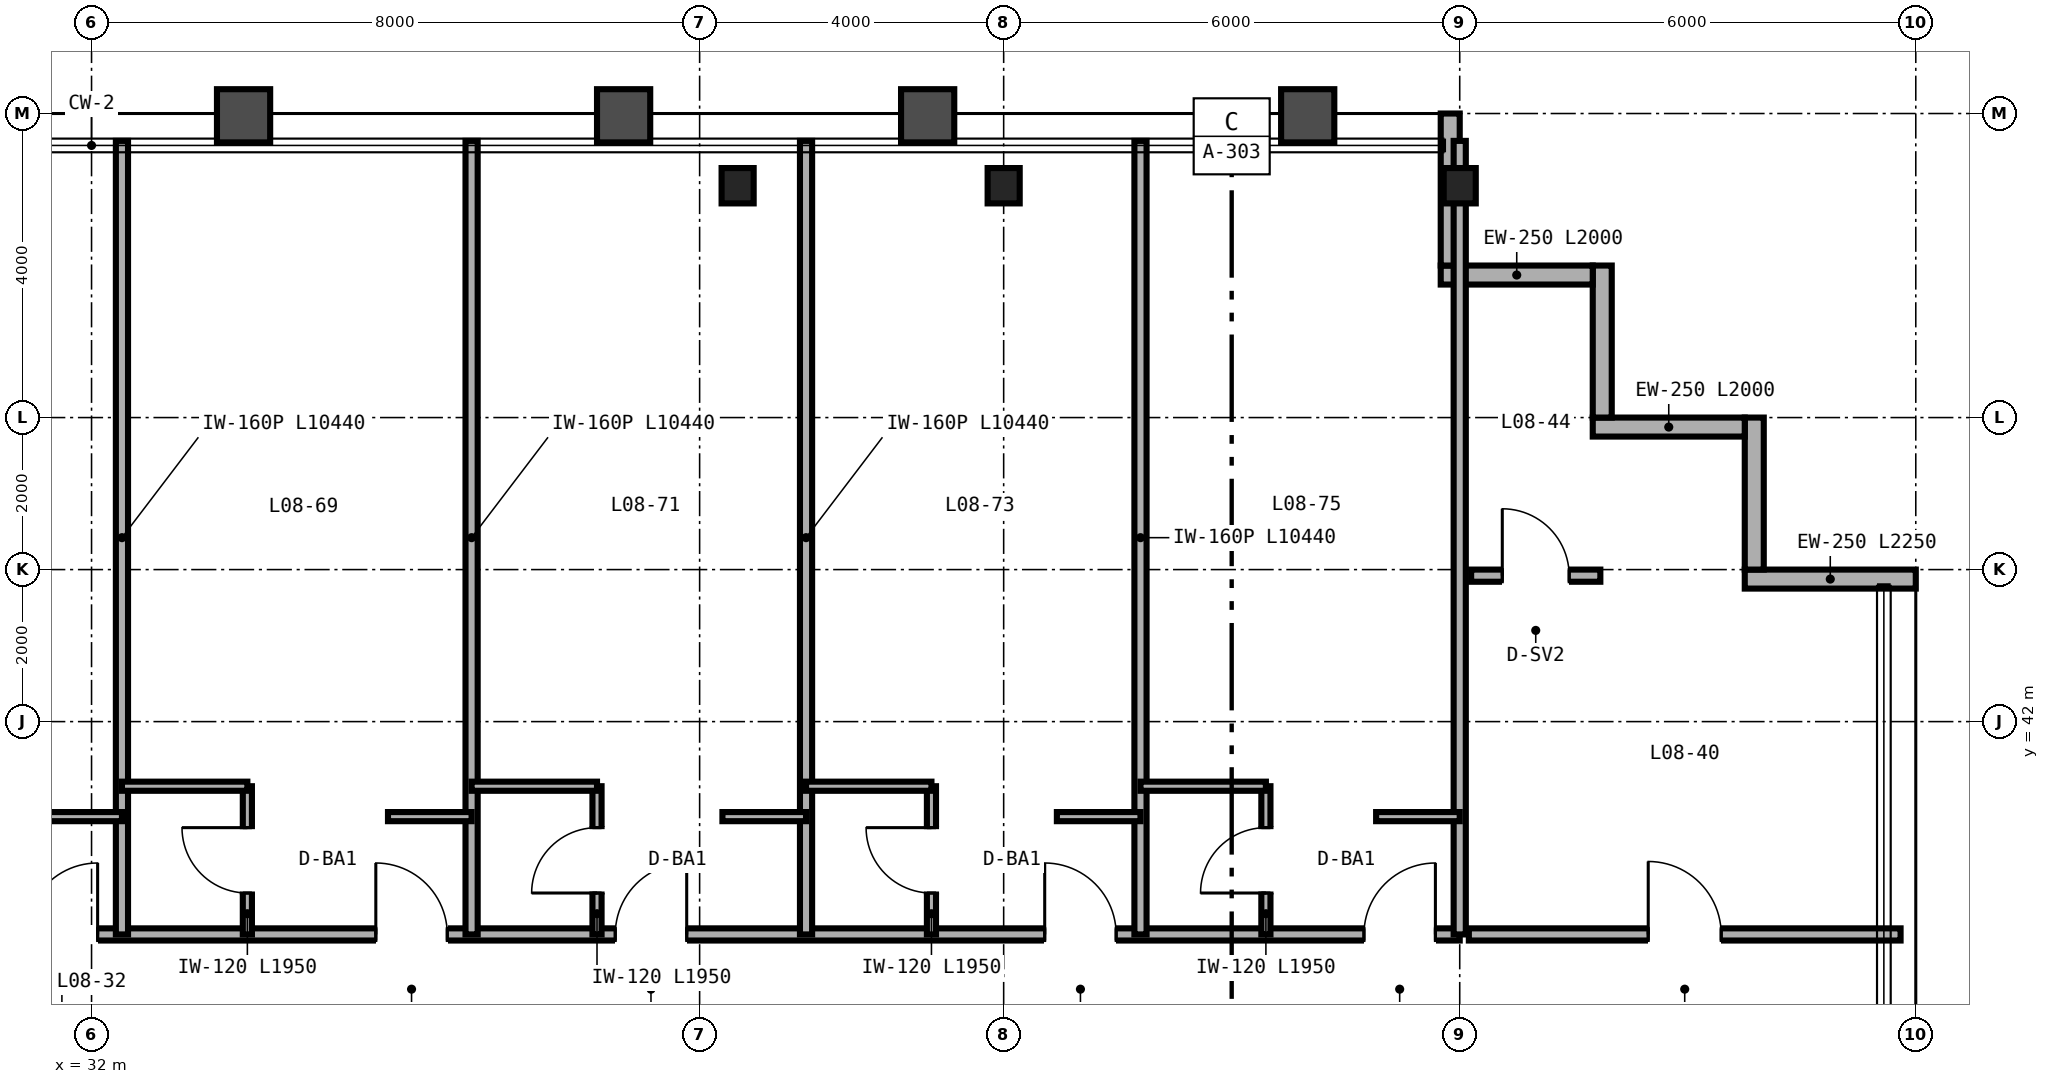
"""IFC4 building model, lengths in metres.
Left out: names, types, materials, properties, quantities, classifications, styles, units other than length and angle.
Written with IfcOpenShell. Run it as: python <this file> out.ifc"""

import sys

from ifc_helpers import new_model, si_unit, direction, frame, frame_2d, origin, origin_2d, place, context, subcontext, project, spatial, rectangle, i_section, extrude, source, transform, mapped, element, fill, save


model = new_model("IFC4")
c1 = context("Model", 3, precision=1e-05, world=origin(), true_north=direction((0.0, 1.0)))
c2 = subcontext(c1, "Body", "Model", "MODEL_VIEW")
j1 = project(units=[si_unit("LENGTHUNIT", "METRE"), si_unit("PLANEANGLEUNIT", "RADIAN")], contexts=[c1])
p1 = place(None, origin())
s1 = spatial("IfcSite", under=j1, at=p1, CompositionType="ELEMENT")
p2 = place(p1, origin())
s2 = spatial("IfcBuilding", under=s1, at=p2, CompositionType="ELEMENT")
p3 = place(p2, frame((0.0, 0.0, 38.4)))
s3 = spatial("IfcBuildingStorey", under=s2, at=p3, CompositionType="ELEMENT", Elevation=38.4)
m1 = source(origin(), c2, "Body", "SweptSolid", [
    extrude(i_section(OverallWidth=0.422, OverallDepth=0.465, WebThickness=0.045, FlangeThickness=0.073, FilletRadius=0.025, at=origin_2d()), origin(), (0.0, 0.0, 1.0), 3.35),
])
for number, where, z_axis, x_axis in (
    (1, (40.5, 49.05, 0.0), (0.0, 0.0, 1.0), (1.0, 0.0, 0.0)),
    (2, (44.0, 49.05, 0.0), (0.0, 0.0, 1.0), (1.0, 0.0, 0.0)),
    (3, (50.0, 49.05, 0.0), (0.0, 0.0, 1.0), (1.0, 0.0, 0.0)),
):
    element("IfcColumn", number, at=place(p3, frame(where, z_axis=z_axis, x_axis=x_axis)), inside=s3, PredefinedType="COLUMN", context=c2, shape_type="MappedRepresentation", body=[
        mapped(m1, transform((0.0, 0.0, 0.0), scale=1.0)),
    ])
p4 = place(p3, frame((56.0, 43.875, 0.0), z_axis=(0.0, 0.0, 1.0), x_axis=(-1.0, 0.0, 0.0)))
e4 = element("IfcWall", 4, at=p4, inside=s3, PredefinedType="SOLIDWALL", context=c2, shape_type="SweptSolid", body=[
    extrude(rectangle(XDim=2.25, YDim=0.25, at=frame_2d((1.125, 0.0))), origin(), (0.0, 0.0, 1.0), 3.35),
])
for number, where, z_axis, x_axis in (
    (5, (53.875, 44.0, 0.0), (0.0, 0.0, 1.0), (0.0, 1.0, 0.0)),
    (6, (53.75, 45.875, 0.0), (0.0, 0.0, 1.0), (-1.0, 0.0, 0.0)),
    (7, (51.875, 46.0, 0.0), (0.0, 0.0, 1.0), (0.0, 1.0, 0.0)),
    (8, (51.75, 47.875, 0.0), (0.0, 0.0, 1.0), (-1.0, 0.0, 0.0)),
):
    element("IfcWall", number, at=place(p3, frame(where, z_axis=z_axis, x_axis=x_axis)), inside=s3, PredefinedType="SOLIDWALL", context=c2, shape_type="SweptSolid", body=[
        extrude(rectangle(XDim=2.0, YDim=0.25, at=frame_2d((1.0, 0.0))), origin(), (0.0, 0.0, 1.0), 3.35),
    ])
p5 = place(p3, frame((49.875, 48.0, 0.0), z_axis=(0.0, 0.0, 1.0), x_axis=(0.0, 1.0, 0.0)))
e9 = element("IfcWall", 9, at=p5, inside=s3, PredefinedType="SOLIDWALL", context=c2, shape_type="SweptSolid", body=[
    extrude(rectangle(XDim=2.0, YDim=0.25, at=frame_2d((1.0, 0.0))), origin(), (0.0, 0.0, 1.0), 2.657),
])
p6 = place(p3, frame((50.12, 39.2, 0.0), z_axis=(0.0, 0.0, 1.0), x_axis=(1.0, 0.0, 0.0)))
e10 = element("IfcWall", 10, at=p6, inside=s3, PredefinedType="PARTITIONING", context=c2, shape_type="SweptSolid", body=[
    extrude(rectangle(XDim=5.68, YDim=0.16, at=frame_2d((2.84, 0.0))), origin(), (0.0, 0.0, 1.0), 3.35),
])
p7 = place(p6, frame((2.36, 0.0, 0.0)))
e11 = element("IfcOpeningElement", 11, at=p7, cuts=e10, PredefinedType="OPENING", context=c2, shape_type="SweptSolid", body=[
    extrude(rectangle(XDim=0.96, YDim=2.15, at=frame_2d((0.48, 1.075))), frame((0.0, 0.09, 0.0), z_axis=(0.0, -1.0, 0.0), x_axis=(1.0, 0.0, 0.0)), (0.0, 0.0, 1.0), 0.18),
])
p8 = place(p3, frame((50.15, 43.92, 0.0), z_axis=(0.0, 0.0, 1.0), x_axis=(1.0, 0.0, 0.0)))
e12 = element("IfcWall", 12, at=p8, inside=s3, PredefinedType="PARTITIONING", context=c2, shape_type="SweptSolid", body=[
    extrude(rectangle(XDim=1.7, YDim=0.16, at=frame_2d((0.85, 0.0))), origin(), (0.0, 0.0, 1.0), 3.35),
])
p9 = place(p8, frame((0.41, 0.0, 0.0)))
e13 = element("IfcOpeningElement", 13, at=p9, cuts=e12, PredefinedType="OPENING", context=c2, shape_type="SweptSolid", body=[
    extrude(rectangle(XDim=0.88, YDim=2.15, at=frame_2d((0.44, 1.075))), frame((0.0, 0.09, 0.0), z_axis=(0.0, -1.0, 0.0), x_axis=(1.0, 0.0, 0.0)), (0.0, 0.0, 1.0), 0.18),
])
p10 = place(p3, frame((14.0, 39.2, 0.0), z_axis=(0.0, 0.0, 1.0), x_axis=(1.0, 0.0, 0.0)))
e14 = element("IfcWall", 14, at=p10, inside=s3, PredefinedType="PARTITIONING", context=c2, shape_type="SweptSolid", body=[
    extrude(rectangle(XDim=36.0, YDim=0.16, at=frame_2d((18.0, 0.0))), origin(), (0.0, 0.0, 1.0), 2.571),
])
p11 = place(p10, frame((3.34, 0.0, 0.0)))
e15 = element("IfcOpeningElement", 15, at=p11, cuts=e14, PredefinedType="OPENING", context=c2, shape_type="SweptSolid", body=[
    extrude(rectangle(XDim=0.94, YDim=2.15, at=frame_2d((0.47, 1.075))), frame((0.0, 0.09, 0.0), z_axis=(0.0, -1.0, 0.0), x_axis=(1.0, 0.0, 0.0)), (0.0, 0.0, 1.0), 0.18),
])
p12 = place(p10, frame((7.79, 0.0, 0.0)))
e16 = element("IfcOpeningElement", 16, at=p12, cuts=e14, PredefinedType="OPENING", context=c2, shape_type="SweptSolid", body=[
    extrude(rectangle(XDim=0.94, YDim=2.15, at=frame_2d((0.47, 1.075))), frame((0.0, 0.09, 0.0), z_axis=(0.0, -1.0, 0.0), x_axis=(1.0, 0.0, 0.0)), (0.0, 0.0, 1.0), 0.18),
])
p13 = place(p10, frame((12.54, 0.0, 0.0)))
e17 = element("IfcOpeningElement", 17, at=p13, cuts=e14, PredefinedType="OPENING", context=c2, shape_type="SweptSolid", body=[
    extrude(rectangle(XDim=0.94, YDim=2.15, at=frame_2d((0.47, 1.075))), frame((0.0, 0.09, 0.0), z_axis=(0.0, -1.0, 0.0), x_axis=(1.0, 0.0, 0.0)), (0.0, 0.0, 1.0), 0.18),
])
p14 = place(p10, frame((17.14, 0.0, 0.0)))
e18 = element("IfcOpeningElement", 18, at=p14, cuts=e14, PredefinedType="OPENING", context=c2, shape_type="SweptSolid", body=[
    extrude(rectangle(XDim=0.94, YDim=2.15, at=frame_2d((0.47, 1.075))), frame((0.0, 0.09, 0.0), z_axis=(0.0, -1.0, 0.0), x_axis=(1.0, 0.0, 0.0)), (0.0, 0.0, 1.0), 0.18),
])
p15 = place(p10, frame((21.74, 0.0, 0.0)))
e19 = element("IfcOpeningElement", 19, at=p15, cuts=e14, PredefinedType="OPENING", context=c2, shape_type="SweptSolid", body=[
    extrude(rectangle(XDim=0.94, YDim=2.15, at=frame_2d((0.47, 1.075))), frame((0.0, 0.09, 0.0), z_axis=(0.0, -1.0, 0.0), x_axis=(1.0, 0.0, 0.0)), (0.0, 0.0, 1.0), 0.18),
])
p16 = place(p10, frame((24.89, 0.0, 0.0)))
e20 = element("IfcOpeningElement", 20, at=p16, cuts=e14, PredefinedType="OPENING", context=c2, shape_type="SweptSolid", body=[
    extrude(rectangle(XDim=0.94, YDim=2.15, at=frame_2d((0.47, 1.075))), frame((0.0, 0.09, 0.0), z_axis=(0.0, -1.0, 0.0), x_axis=(1.0, 0.0, 0.0)), (0.0, 0.0, 1.0), 0.18),
])
p17 = place(p10, frame((30.54, 0.0, 0.0)))
e21 = element("IfcOpeningElement", 21, at=p17, cuts=e14, PredefinedType="OPENING", context=c2, shape_type="SweptSolid", body=[
    extrude(rectangle(XDim=0.94, YDim=2.15, at=frame_2d((0.47, 1.075))), frame((0.0, 0.09, 0.0), z_axis=(0.0, -1.0, 0.0), x_axis=(1.0, 0.0, 0.0)), (0.0, 0.0, 1.0), 0.18),
])
p18 = place(p10, frame((34.74, 0.0, 0.0)))
e22 = element("IfcOpeningElement", 22, at=p18, cuts=e14, PredefinedType="OPENING", context=c2, shape_type="SweptSolid", body=[
    extrude(rectangle(XDim=0.94, YDim=2.15, at=frame_2d((0.47, 1.075))), frame((0.0, 0.09, 0.0), z_axis=(0.0, -1.0, 0.0), x_axis=(1.0, 0.0, 0.0)), (0.0, 0.0, 1.0), 0.18),
])
p19 = place(p3, frame((50.0, 39.2, 0.0), z_axis=(0.0, 0.0, 1.0), x_axis=(0.0, 1.0, 0.0)))
e23 = element("IfcWall", 23, at=p19, inside=s3, PredefinedType="PARTITIONING", context=c2, shape_type="SweptSolid", body=[
    extrude(rectangle(XDim=10.44, YDim=0.16, at=frame_2d((5.22, 0.0))), origin(), (0.0, 0.0, 1.0), 2.657),
])
p20 = place(p3, frame((32.4, 39.2, 0.0), z_axis=(0.0, 0.0, 1.0), x_axis=(0.0, 1.0, 0.0)))
e24 = element("IfcWall", 24, at=p20, inside=s3, PredefinedType="PARTITIONING", context=c2, shape_type="SweptSolid", body=[
    extrude(rectangle(XDim=10.44, YDim=0.16, at=frame_2d((5.22, 0.0))), origin(), (0.0, 0.0, 1.0), 2.423),
])
p21 = place(p3, frame((31.3, 40.75, 0.0), z_axis=(0.0, 0.0, 1.0), x_axis=(1.0, 0.0, 0.0)))
e25 = element("IfcWall", 25, at=p21, inside=s3, PredefinedType="PARTITIONING", context=c2, shape_type="SweptSolid", body=[
    extrude(rectangle(XDim=1.1, YDim=0.12, at=frame_2d((0.55, 0.0))), origin(), (0.0, 0.0, 1.0), 3.35),
])
p22 = place(p3, frame((37.0, 39.2, 0.0), z_axis=(0.0, 0.0, 1.0), x_axis=(0.0, 1.0, 0.0)))
e26 = element("IfcWall", 26, at=p22, inside=s3, PredefinedType="PARTITIONING", context=c2, shape_type="SweptSolid", body=[
    extrude(rectangle(XDim=10.44, YDim=0.16, at=frame_2d((5.22, 0.0))), origin(), (0.0, 0.0, 1.0), 2.423),
])
p23 = place(p3, frame((34.05, 39.2, 0.0), z_axis=(0.0, 0.0, 1.0), x_axis=(0.0, 1.0, 0.0)))
e27 = element("IfcWall", 27, at=p23, inside=s3, PredefinedType="PARTITIONING", context=c2, shape_type="SweptSolid", body=[
    extrude(rectangle(XDim=1.95, YDim=0.12, at=frame_2d((0.975, 0.0))), origin(), (0.0, 0.0, 1.0), 3.35),
])
p24 = place(p23, frame((0.545, 0.0, 0.0)))
e28 = element("IfcOpeningElement", 28, at=p24, cuts=e27, PredefinedType="OPENING", context=c2, shape_type="SweptSolid", body=[
    extrude(rectangle(XDim=0.86, YDim=2.1, at=frame_2d((0.43, 1.05))), frame((0.0, 0.07, 0.0), z_axis=(0.0, -1.0, 0.0), x_axis=(1.0, 0.0, 0.0)), (0.0, 0.0, 1.0), 0.14),
])
p25 = place(p3, frame((32.4, 41.15, 0.0), z_axis=(0.0, 0.0, 1.0), x_axis=(1.0, 0.0, 0.0)))
e29 = element("IfcWall", 29, at=p25, inside=s3, PredefinedType="PARTITIONING", context=c2, shape_type="SweptSolid", body=[
    extrude(rectangle(XDim=1.65, YDim=0.12, at=frame_2d((0.825, 0.0))), origin(), (0.0, 0.0, 1.0), 3.35),
])
p26 = place(p3, frame((35.9, 40.75, 0.0), z_axis=(0.0, 0.0, 1.0), x_axis=(1.0, 0.0, 0.0)))
e30 = element("IfcWall", 30, at=p26, inside=s3, PredefinedType="PARTITIONING", context=c2, shape_type="SweptSolid", body=[
    extrude(rectangle(XDim=1.1, YDim=0.12, at=frame_2d((0.55, 0.0))), origin(), (0.0, 0.0, 1.0), 3.35),
])
p27 = place(p3, frame((41.4, 39.2, 0.0), z_axis=(0.0, 0.0, 1.0), x_axis=(0.0, 1.0, 0.0)))
e31 = element("IfcWall", 31, at=p27, inside=s3, PredefinedType="PARTITIONING", context=c2, shape_type="SweptSolid", body=[
    extrude(rectangle(XDim=10.44, YDim=0.16, at=frame_2d((5.22, 0.0))), origin(), (0.0, 0.0, 1.0), 2.813),
])
p28 = place(p3, frame((38.65, 39.2, 0.0), z_axis=(0.0, 0.0, 1.0), x_axis=(0.0, 1.0, 0.0)))
e32 = element("IfcWall", 32, at=p28, inside=s3, PredefinedType="PARTITIONING", context=c2, shape_type="SweptSolid", body=[
    extrude(rectangle(XDim=1.95, YDim=0.12, at=frame_2d((0.975, 0.0))), origin(), (0.0, 0.0, 1.0), 3.35),
])
p29 = place(p28, frame((0.545, 0.0, 0.0)))
e33 = element("IfcOpeningElement", 33, at=p29, cuts=e32, PredefinedType="OPENING", context=c2, shape_type="SweptSolid", body=[
    extrude(rectangle(XDim=0.86, YDim=2.1, at=frame_2d((0.43, 1.05))), frame((0.0, 0.07, 0.0), z_axis=(0.0, -1.0, 0.0), x_axis=(1.0, 0.0, 0.0)), (0.0, 0.0, 1.0), 0.14),
])
p30 = place(p3, frame((37.0, 41.15, 0.0), z_axis=(0.0, 0.0, 1.0), x_axis=(1.0, 0.0, 0.0)))
e34 = element("IfcWall", 34, at=p30, inside=s3, PredefinedType="PARTITIONING", context=c2, shape_type="SweptSolid", body=[
    extrude(rectangle(XDim=1.65, YDim=0.12, at=frame_2d((0.825, 0.0))), origin(), (0.0, 0.0, 1.0), 3.35),
])
p31 = place(p3, frame((40.3, 40.75, 0.0), z_axis=(0.0, 0.0, 1.0), x_axis=(1.0, 0.0, 0.0)))
e35 = element("IfcWall", 35, at=p31, inside=s3, PredefinedType="PARTITIONING", context=c2, shape_type="SweptSolid", body=[
    extrude(rectangle(XDim=1.1, YDim=0.12, at=frame_2d((0.55, 0.0))), origin(), (0.0, 0.0, 1.0), 2.571),
])
p32 = place(p3, frame((45.8, 39.2, 0.0), z_axis=(0.0, 0.0, 1.0), x_axis=(0.0, 1.0, 0.0)))
e36 = element("IfcWall", 36, at=p32, inside=s3, PredefinedType="PARTITIONING", context=c2, shape_type="SweptSolid", body=[
    extrude(rectangle(XDim=10.44, YDim=0.16, at=frame_2d((5.22, 0.0))), origin(), (0.0, 0.0, 1.0), 2.657),
])
p33 = place(p3, frame((43.05, 39.2, 0.0), z_axis=(0.0, 0.0, 1.0), x_axis=(0.0, 1.0, 0.0)))
e37 = element("IfcWall", 37, at=p33, inside=s3, PredefinedType="PARTITIONING", context=c2, shape_type="SweptSolid", body=[
    extrude(rectangle(XDim=1.95, YDim=0.12, at=frame_2d((0.975, 0.0))), origin(), (0.0, 0.0, 1.0), 3.35),
])
p34 = place(p33, frame((0.545, 0.0, 0.0)))
e38 = element("IfcOpeningElement", 38, at=p34, cuts=e37, PredefinedType="OPENING", context=c2, shape_type="SweptSolid", body=[
    extrude(rectangle(XDim=0.86, YDim=2.1, at=frame_2d((0.43, 1.05))), frame((0.0, 0.07, 0.0), z_axis=(0.0, -1.0, 0.0), x_axis=(1.0, 0.0, 0.0)), (0.0, 0.0, 1.0), 0.14),
])
p35 = place(p3, frame((41.4, 41.15, 0.0), z_axis=(0.0, 0.0, 1.0), x_axis=(1.0, 0.0, 0.0)))
e39 = element("IfcWall", 39, at=p35, inside=s3, PredefinedType="PARTITIONING", context=c2, shape_type="SweptSolid", body=[
    extrude(rectangle(XDim=1.65, YDim=0.12, at=frame_2d((0.825, 0.0))), origin(), (0.0, 0.0, 1.0), 3.35),
])
p36 = place(p3, frame((44.7, 40.75, 0.0), z_axis=(0.0, 0.0, 1.0), x_axis=(1.0, 0.0, 0.0)))
e40 = element("IfcWall", 40, at=p36, inside=s3, PredefinedType="PARTITIONING", context=c2, shape_type="SweptSolid", body=[
    extrude(rectangle(XDim=1.1, YDim=0.12, at=frame_2d((0.55, 0.0))), origin(), (0.0, 0.0, 1.0), 3.35),
])
p37 = place(p3, frame((47.45, 39.2, 0.0), z_axis=(0.0, 0.0, 1.0), x_axis=(0.0, 1.0, 0.0)))
e41 = element("IfcWall", 41, at=p37, inside=s3, PredefinedType="PARTITIONING", context=c2, shape_type="SweptSolid", body=[
    extrude(rectangle(XDim=1.95, YDim=0.12, at=frame_2d((0.975, 0.0))), origin(), (0.0, 0.0, 1.0), 3.35),
])
p38 = place(p37, frame((0.545, 0.0, 0.0)))
e42 = element("IfcOpeningElement", 42, at=p38, cuts=e41, PredefinedType="OPENING", context=c2, shape_type="SweptSolid", body=[
    extrude(rectangle(XDim=0.86, YDim=2.1, at=frame_2d((0.43, 1.05))), frame((0.0, 0.07, 0.0), z_axis=(0.0, -1.0, 0.0), x_axis=(1.0, 0.0, 0.0)), (0.0, 0.0, 1.0), 0.14),
])
p39 = place(p3, frame((45.8, 41.15, 0.0), z_axis=(0.0, 0.0, 1.0), x_axis=(1.0, 0.0, 0.0)))
e43 = element("IfcWall", 43, at=p39, inside=s3, PredefinedType="PARTITIONING", context=c2, shape_type="SweptSolid", body=[
    extrude(rectangle(XDim=1.65, YDim=0.12, at=frame_2d((0.825, 0.0))), origin(), (0.0, 0.0, 1.0), 3.35),
])
p40 = place(p3, frame((48.9, 40.75, 0.0), z_axis=(0.0, 0.0, 1.0), x_axis=(1.0, 0.0, 0.0)))
e44 = element("IfcWall", 44, at=p40, inside=s3, PredefinedType="PARTITIONING", context=c2, shape_type="SweptSolid", body=[
    extrude(rectangle(XDim=1.1, YDim=0.12, at=frame_2d((0.55, 0.0))), origin(), (0.0, 0.0, 1.0), 3.35),
])
m2 = source(origin(), c2, "Body", "SweptSolid", [
    extrude(rectangle(XDim=0.96, YDim=2.15, at=frame_2d((0.48, 1.075))), frame((0.0, 0.025, 0.0), z_axis=(0.0, -1.0, 0.0), x_axis=(1.0, 0.0, 0.0)), (0.0, 0.0, 1.0), 0.05),
])
p41 = place(p7, origin())
e45 = element("IfcDoor", 45, at=p41, inside=s3, OperationType="SINGLE_SWING_LEFT", PredefinedType="DOOR", context=c2, shape_type="MappedRepresentation", body=[
    mapped(m2, transform((0.0, 0.0, 0.0), scale=1.0)),
])
fill(e11, e45)
m3 = source(origin(), c2, "Body", "SweptSolid", [
    extrude(rectangle(XDim=0.88, YDim=2.15, at=frame_2d((0.44, 1.075))), frame((0.0, 0.025, 0.0), z_axis=(0.0, -1.0, 0.0), x_axis=(1.0, 0.0, 0.0)), (0.0, 0.0, 1.0), 0.05),
])
p42 = place(p9, origin())
e46 = element("IfcDoor", 46, at=p42, inside=s3, OperationType="SINGLE_SWING_LEFT", PredefinedType="DOOR", context=c2, shape_type="MappedRepresentation", body=[
    mapped(m3, transform((0.0, 0.0, 0.0), scale=1.0)),
])
fill(e13, e46)
m4 = source(origin(), c2, "Body", "SweptSolid", [
    extrude(rectangle(XDim=0.86, YDim=2.1, at=frame_2d((0.43, 1.05))), frame((0.0, 0.025, 0.0), z_axis=(0.0, -1.0, 0.0), x_axis=(1.0, 0.0, 0.0)), (0.0, 0.0, 1.0), 0.05),
])
p43 = place(p24, origin())
e47 = element("IfcDoor", 47, at=p43, inside=s3, OperationType="SINGLE_SWING_RIGHT", PredefinedType="DOOR", context=c2, shape_type="MappedRepresentation", body=[
    mapped(m4, transform((0.0, 0.0, 0.0), scale=1.0)),
])
fill(e28, e47)
p44 = place(p29, origin())
e48 = element("IfcDoor", 48, at=p44, inside=s3, OperationType="SINGLE_SWING_LEFT", PredefinedType="DOOR", context=c2, shape_type="MappedRepresentation", body=[
    mapped(m4, transform((0.0, 0.0, 0.0), scale=1.0)),
])
fill(e33, e48)
p45 = place(p34, origin())
e49 = element("IfcDoor", 49, at=p45, inside=s3, OperationType="SINGLE_SWING_RIGHT", PredefinedType="DOOR", context=c2, shape_type="MappedRepresentation", body=[
    mapped(m4, transform((0.0, 0.0, 0.0), scale=1.0)),
])
fill(e38, e49)
p46 = place(p38, origin())
e50 = element("IfcDoor", 50, at=p46, inside=s3, OperationType="SINGLE_SWING_LEFT", PredefinedType="DOOR", context=c2, shape_type="MappedRepresentation", body=[
    mapped(m4, transform((0.0, 0.0, 0.0), scale=1.0)),
])
fill(e42, e50)
m5 = source(origin(), c2, "Body", "SweptSolid", [
    extrude(rectangle(XDim=0.94, YDim=2.15, at=frame_2d((0.47, 1.075))), frame((0.0, 0.025, 0.0), z_axis=(0.0, -1.0, 0.0), x_axis=(1.0, 0.0, 0.0)), (0.0, 0.0, 1.0), 0.05),
])
p47 = place(p14, origin())
e51 = element("IfcDoor", 51, at=p47, inside=s3, OperationType="SINGLE_SWING_RIGHT", PredefinedType="DOOR", context=c2, shape_type="MappedRepresentation", body=[
    mapped(m5, transform((0.0, 0.0, 0.0), scale=1.0)),
])
fill(e18, e51)
p48 = place(p15, origin())
e52 = element("IfcDoor", 52, at=p48, inside=s3, OperationType="SINGLE_SWING_LEFT", PredefinedType="DOOR", context=c2, shape_type="MappedRepresentation", body=[
    mapped(m5, transform((0.0, 0.0, 0.0), scale=1.0)),
])
fill(e19, e52)
p49 = place(p16, origin())
e53 = element("IfcDoor", 53, at=p49, inside=s3, OperationType="SINGLE_SWING_RIGHT", PredefinedType="DOOR", context=c2, shape_type="MappedRepresentation", body=[
    mapped(m5, transform((0.0, 0.0, 0.0), scale=1.0)),
])
fill(e20, e53)
p50 = place(p17, origin())
e54 = element("IfcDoor", 54, at=p50, inside=s3, OperationType="SINGLE_SWING_LEFT", PredefinedType="DOOR", context=c2, shape_type="MappedRepresentation", body=[
    mapped(m5, transform((0.0, 0.0, 0.0), scale=1.0)),
])
fill(e21, e54)
p51 = place(p18, origin())
e55 = element("IfcDoor", 55, at=p51, inside=s3, OperationType="SINGLE_SWING_RIGHT", PredefinedType="DOOR", context=c2, shape_type="MappedRepresentation", body=[
    mapped(m5, transform((0.0, 0.0, 0.0), scale=1.0)),
])
fill(e22, e55)
save(model, sys.argv[1])
